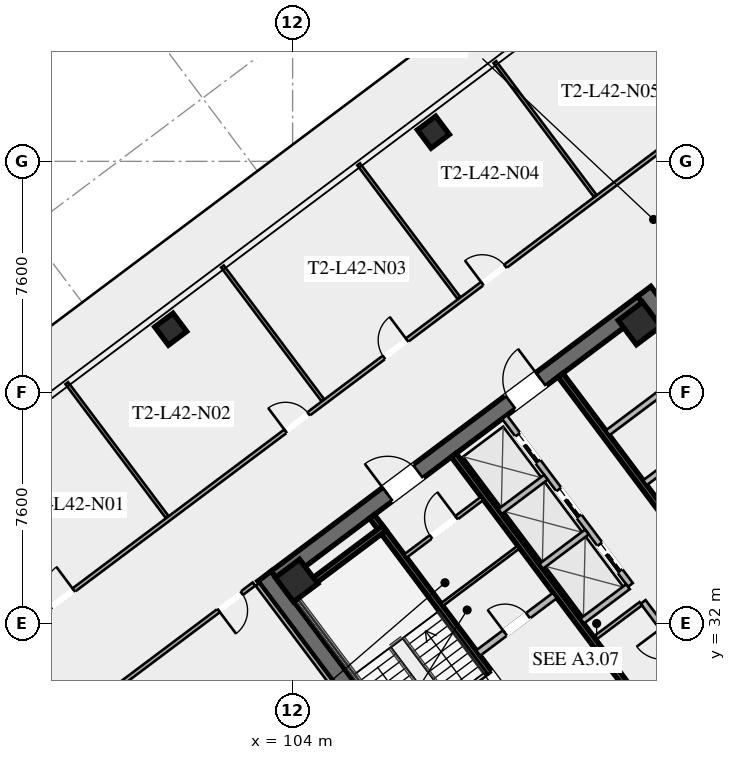
"""IFC4 building model, lengths in metres.
Left out: names, types, materials, properties, quantities, classifications, styles, units other than length and angle.
Written with IfcOpenShell. Run it as: python <this file> out.ifc"""

import sys

from ifc_helpers import new_model, si_unit, direction, frame, frame_2d, origin, origin_2d, place, context, subcontext, project, spatial, rectangle, hollow_rectangle, extrude, element, fill, save


model = new_model("IFC4")
c1 = context("Model", 3, precision=1e-05, world=origin(), true_north=direction((0.0, 1.0)))
c2 = subcontext(c1, "Body", "Model", "MODEL_VIEW")
j1 = project(units=[si_unit("LENGTHUNIT", "METRE"), si_unit("PLANEANGLEUNIT", "RADIAN")], contexts=[c1])
p1 = place(None, origin())
s1 = spatial("IfcSite", under=j1, at=p1, CompositionType="ELEMENT")
p2 = place(p1, origin())
s2 = spatial("IfcBuilding", under=s1, at=p2, CompositionType="ELEMENT")
p3 = place(p2, frame((0.0, 0.0, 157.0)))
s3 = spatial("IfcBuildingStorey", under=s2, at=p3, CompositionType="ELEMENT", Elevation=157.0)
for number, where, z_axis, x_axis in (
    (1, (112.436, 21.077, 0.0), (0.0, 0.0, 1.0), (-0.6, 0.8, 0.0)),
    (2, (115.564, 42.923, 0.0), (0.0, 0.0, 1.0), (0.6, -0.8, 0.0)),
):
    element("IfcWall", number, at=place(p3, frame(where, z_axis=z_axis, x_axis=x_axis)), inside=s3, PredefinedType="SHEAR", context=c2, shape_type="SweptSolid", body=[
        extrude(rectangle(XDim=15.6, YDim=0.55, at=frame_2d((7.8, 0.0))), origin(), (0.0, 0.0, 1.0), 3.55),
    ])
p4 = place(p3, frame((124.539, 30.498, 0.0), z_axis=(0.0, 0.0, 1.0), x_axis=(-0.799998054672, -0.600002593761, 0.0)))
e3 = element("IfcWall", 3, at=p4, inside=s3, PredefinedType="SHEAR", context=c2, shape_type="SweptSolid", body=[
    extrude(rectangle(XDim=15.06, YDim=0.55, at=frame_2d((7.53, 0.0))), origin(), (0.0, 0.0, 1.0), 3.55),
])
p5 = place(p4, frame((9.23, 0.0, 0.0)))
e4 = element("IfcOpeningElement", 4, at=p5, cuts=e3, PredefinedType="OPENING", context=c2, shape_type="SweptSolid", body=[
    extrude(rectangle(XDim=1.25, YDim=2.25, at=frame_2d((0.625, 1.125))), frame((0.0, 0.285, 0.0), z_axis=(0.0, -1.0, 0.0), x_axis=(1.0, 0.0, 0.0)), (0.0, 0.0, 1.0), 0.57),
])
p6 = place(p4, frame((4.18, 0.0, 0.0)))
e5 = element("IfcOpeningElement", 5, at=p6, cuts=e3, PredefinedType="OPENING", context=c2, shape_type="SweptSolid", body=[
    extrude(rectangle(XDim=1.25, YDim=2.25, at=frame_2d((0.625, 1.125))), frame((0.0, 0.285, 0.0), z_axis=(0.0, -1.0, 0.0), x_axis=(1.0, 0.0, 0.0)), (0.0, 0.0, 1.0), 0.57),
])
p7 = place(p3, frame((103.461, 33.502, 0.0), z_axis=(0.0, 0.0, 1.0), x_axis=(0.799998054672, 0.600002593761, 0.0)))
e6 = element("IfcWall", 6, at=p7, inside=s3, PredefinedType="SHEAR", context=c2, shape_type="SweptSolid", body=[
    extrude(rectangle(XDim=15.06, YDim=0.55, at=frame_2d((7.53, 0.0))), origin(), (0.0, 0.0, 1.0), 3.55),
])
p8 = place(p7, frame((4.58, 0.0, 0.0)))
e7 = element("IfcOpeningElement", 7, at=p8, cuts=e6, PredefinedType="OPENING", context=c2, shape_type="SweptSolid", body=[
    extrude(rectangle(XDim=1.25, YDim=2.25, at=frame_2d((0.625, 1.125))), frame((0.0, 0.285, 0.0), z_axis=(0.0, -1.0, 0.0), x_axis=(1.0, 0.0, 0.0)), (0.0, 0.0, 1.0), 0.57),
])
p9 = place(p7, frame((9.63, 0.0, 0.0)))
e8 = element("IfcOpeningElement", 8, at=p9, cuts=e6, PredefinedType="OPENING", context=c2, shape_type="SweptSolid", body=[
    extrude(rectangle(XDim=1.25, YDim=2.25, at=frame_2d((0.625, 1.125))), frame((0.0, 0.285, 0.0), z_axis=(0.0, -1.0, 0.0), x_axis=(1.0, 0.0, 0.0)), (0.0, 0.0, 1.0), 0.57),
])
for number, where, z_axis, x_axis in (
    (9, (115.41, 41.87, 0.0), (0.0, 0.0, 1.0), (0.8, 0.6, 0.0)),
    (10, (104.13, 33.41, 0.0), (0.0, 0.0, 1.0), (0.8, 0.6, 0.0)),
):
    element("IfcColumn", number, at=place(p3, frame(where, z_axis=z_axis, x_axis=x_axis)), inside=s3, PredefinedType="COLUMN", context=c2, shape_type="SweptSolid", body=[
        extrude(hollow_rectangle(XDim=1.0, YDim=1.0, WallThickness=0.04, at=origin_2d()), origin(), (0.0, 0.0, 1.0), 3.37),
    ])
for number, where, z_axis, x_axis in (
    (11, (108.63, 48.16, -0.175), (0.0, 0.0, 1.0), (0.8, 0.6, 0.0)),
    (12, (99.99, 41.68, -0.175), (0.0, 0.0, 1.0), (0.8, 0.6, 0.0)),
):
    element("IfcColumn", number, at=place(p3, frame(where, z_axis=z_axis, x_axis=x_axis)), inside=s3, PredefinedType="COLUMN", context=c2, shape_type="SweptSolid", body=[
        extrude(hollow_rectangle(XDim=0.75, YDim=0.75, WallThickness=0.032, at=origin_2d()), origin(), (0.0, 0.0, 1.0), 3.545),
    ])
p10 = place(p3, frame((111.44, 29.08, 0.0), z_axis=(0.0, 0.0, 1.0), x_axis=(-0.59999029481, 0.8000072788, 0.0)))
e13 = element("IfcWall", 13, at=p10, inside=s3, PredefinedType="SHEAR", context=c2, shape_type="SweptSolid", body=[
    extrude(rectangle(XDim=8.05, YDim=0.2, at=frame_2d((4.025, 0.0))), origin(), (0.0, 0.0, 1.0), 3.37),
])
p11 = place(p10, frame((0.45, 0.0, 0.0)))
e14 = element("IfcOpeningElement", 14, at=p11, cuts=e13, PredefinedType="OPENING", context=c2, shape_type="SweptSolid", body=[
    extrude(rectangle(XDim=1.15, YDim=2.2, at=frame_2d((0.575, 1.1))), frame((0.0, 0.11, 0.0), z_axis=(0.0, -1.0, 0.0), x_axis=(1.0, 0.0, 0.0)), (0.0, 0.0, 1.0), 0.22),
])
p12 = place(p3, frame((103.956, 32.842, 0.0), z_axis=(0.0, 0.0, 1.0), x_axis=(0.800015298837, 0.599979601008, 0.0)))
e15 = element("IfcWall", 15, at=p12, inside=s3, PredefinedType="SHEAR", context=c2, shape_type="SweptSolid", body=[
    extrude(rectangle(XDim=3.83, YDim=0.2, at=frame_2d((1.915, 0.0))), origin(), (0.0, 0.0, 1.0), 3.37),
])
p13 = place(p3, frame((117.998, 25.936, 0.0), z_axis=(0.0, 0.0, 1.0), x_axis=(-0.600002693989, 0.799997979501, 0.0)))
e16 = element("IfcWall", 16, at=p13, inside=s3, PredefinedType="SHEAR", context=c2, shape_type="SweptSolid", body=[
    extrude(rectangle(XDim=14.5, YDim=0.2, at=frame_2d((7.25, 0.0))), origin(), (0.0, 0.0, 1.0), 3.37),
])
p14 = place(p3, frame((110.104, 31.028, 0.0), z_axis=(0.0, 0.0, 1.0), x_axis=(0.800018601094, 0.59997519774, 0.0)))
e17 = element("IfcWall", 17, at=p14, inside=s3, PredefinedType="SOLIDWALL", context=c2, shape_type="SweptSolid", body=[
    extrude(rectangle(XDim=3.15, YDim=0.22, at=frame_2d((1.575, 0.0))), origin(), (0.0, 0.0, 1.0), 2.723),
])
p15 = place(p14, frame((1.1, 0.0, 0.0)))
e18 = element("IfcOpeningElement", 18, at=p15, cuts=e17, PredefinedType="OPENING", context=c2, shape_type="SweptSolid", body=[
    extrude(rectangle(XDim=0.95, YDim=2.05, at=frame_2d((0.475, 1.025))), frame((0.0, 0.12, 0.0), z_axis=(0.0, -1.0, 0.0), x_axis=(1.0, 0.0, 0.0)), (0.0, 0.0, 1.0), 0.24),
])
p16 = place(p3, frame((112.81, 40.17, 0.0), z_axis=(0.0, 0.0, 1.0), x_axis=(0.599993943644, -0.800004542231, 0.0)))
e19 = element("IfcWall", 19, at=p16, inside=s3, PredefinedType="SHEAR", context=c2, shape_type="SweptSolid", body=[
    extrude(rectangle(XDim=6.45, YDim=0.2, at=frame_2d((3.225, 0.0))), origin(), (0.0, 0.0, 1.0), 3.37),
])
for number, where, z_axis, x_axis in (
    (20, (115.59, 36.63, 0.0), (0.0, 0.0, 1.0), (0.8, 0.6, 0.0)),
    (21, (114.36, 38.27, 0.0), (0.0, 0.0, 1.0), (0.8, 0.6, 0.0)),
):
    element("IfcWall", number, at=place(p3, frame(where, z_axis=z_axis, x_axis=x_axis)), inside=s3, PredefinedType="SOLIDWALL", context=c2, shape_type="SweptSolid", body=[
        extrude(rectangle(XDim=3.48, YDim=0.2, at=frame_2d((1.74, 0.0))), origin(), (0.0, 0.0, 1.0), 3.37),
    ])
p17 = place(p3, frame((107.71, 34.22, 0.0), z_axis=(0.0, 0.0, 1.0), x_axis=(0.799981399002, 0.60002480053, 0.0)))
e22 = element("IfcWall", 22, at=p17, inside=s3, PredefinedType="PARTITIONING", context=c2, shape_type="SweptSolid", body=[
    extrude(rectangle(XDim=3.15, YDim=0.135, at=frame_2d((1.575, 0.0))), origin(), (0.0, 0.0, 1.0), 2.723),
])
p18 = place(p17, frame((1.05, 0.0, 0.0)))
e23 = element("IfcOpeningElement", 23, at=p18, cuts=e22, PredefinedType="OPENING", context=c2, shape_type="SweptSolid", body=[
    extrude(rectangle(XDim=1.05, YDim=2.2, at=frame_2d((0.525, 1.1))), frame((0.0, 0.077, 0.0), z_axis=(0.0, -1.0, 0.0), x_axis=(1.0, 0.0, 0.0)), (0.0, 0.0, 1.0), 0.155),
])
p19 = place(p3, frame((108.91, 32.62, 0.0), z_axis=(0.0, 0.0, 1.0), x_axis=(0.800018601094, 0.59997519774, 0.0)))
e24 = element("IfcWall", 24, at=p19, inside=s3, PredefinedType="PARTITIONING", context=c2, shape_type="SweptSolid", body=[
    extrude(rectangle(XDim=3.15, YDim=0.11, at=frame_2d((1.575, 0.0))), origin(), (0.0, 0.0, 1.0), 2.723),
])
p20 = place(p3, frame((119.67, 27.19, 0.0), z_axis=(0.0, 0.0, 1.0), x_axis=(-0.599988677396, 0.800008491828, 0.0)))
e25 = element("IfcWall", 25, at=p20, inside=s3, PredefinedType="SOLIDWALL", context=c2, shape_type="SweptSolid", body=[
    extrude(rectangle(XDim=6.9, YDim=0.2, at=frame_2d((3.45, 0.0))), origin(), (0.0, 0.0, 1.0), 2.723),
])
p21 = place(p20, frame((0.85, 0.0, 0.0)))
e26 = element("IfcOpeningElement", 26, at=p21, cuts=e25, PredefinedType="OPENING", context=c2, shape_type="SweptSolid", body=[
    extrude(rectangle(XDim=0.95, YDim=2.05, at=frame_2d((0.475, 1.025))), frame((0.0, 0.11, 0.0), z_axis=(0.0, -1.0, 0.0), x_axis=(1.0, 0.0, 0.0)), (0.0, 0.0, 1.0), 0.22),
])
p22 = place(p20, frame((4.8, 0.0, 0.0)))
e27 = element("IfcOpeningElement", 27, at=p22, cuts=e25, PredefinedType="OPENING", context=c2, shape_type="SweptSolid", body=[
    extrude(rectangle(XDim=1.05, YDim=2.2, at=frame_2d((0.525, 1.1))), frame((0.0, 0.11, 0.0), z_axis=(0.0, -1.0, 0.0), x_axis=(1.0, 0.0, 0.0)), (0.0, 0.0, 1.0), 0.22),
])
for number, where, z_axis, x_axis in (
    (28, (113.946, 31.522, 0.0), (0.0, 0.0, 1.0), (0.8, 0.6, 0.0)),
    (29, (115.746, 29.122, 0.0), (0.0, 0.0, 1.0), (0.8, 0.6, 0.0)),
):
    element("IfcWall", number, at=place(p3, frame(where, z_axis=z_axis, x_axis=x_axis)), inside=s3, PredefinedType="PARTITIONING", context=c2, shape_type="SweptSolid", body=[
        extrude(rectangle(XDim=1.88, YDim=0.135, at=frame_2d((0.94, 0.0))), origin(), (0.0, 0.0, 1.0), 2.723),
    ])
p23 = place(p3, frame((115.11, 33.27, 0.0), z_axis=(0.0, 0.0, 1.0), x_axis=(-0.600011322243, 0.799991508192, 0.0)))
e30 = element("IfcWall", 30, at=p23, inside=s3, PredefinedType="SOLIDWALL", context=c2, shape_type="SweptSolid", body=[
    extrude(rectangle(XDim=6.9, YDim=0.2, at=frame_2d((3.45, 0.0))), origin(), (0.0, 0.0, 1.0), 3.37),
])
p24 = place(p23, frame((0.575, 0.0, 0.0)))
e31 = element("IfcOpeningElement", 31, at=p24, cuts=e30, PredefinedType="OPENING", context=c2, shape_type="SweptSolid", body=[
    extrude(rectangle(XDim=1.1, YDim=2.2, at=frame_2d((0.55, 1.1))), frame((0.0, 0.11, 0.0), z_axis=(0.0, -1.0, 0.0), x_axis=(1.0, 0.0, 0.0)), (0.0, 0.0, 1.0), 0.22),
])
p25 = place(p23, frame((2.825, 0.0, 0.0)))
e32 = element("IfcOpeningElement", 32, at=p25, cuts=e30, PredefinedType="OPENING", context=c2, shape_type="SweptSolid", body=[
    extrude(rectangle(XDim=1.1, YDim=2.2, at=frame_2d((0.55, 1.1))), frame((0.0, 0.11, 0.0), z_axis=(0.0, -1.0, 0.0), x_axis=(1.0, 0.0, 0.0)), (0.0, 0.0, 1.0), 0.22),
])
p26 = place(p23, frame((5.075, 0.0, 0.0)))
e33 = element("IfcOpeningElement", 33, at=p26, cuts=e30, PredefinedType="OPENING", context=c2, shape_type="SweptSolid", body=[
    extrude(rectangle(XDim=1.1, YDim=2.2, at=frame_2d((0.55, 1.1))), frame((0.0, 0.11, 0.0), z_axis=(0.0, -1.0, 0.0), x_axis=(1.0, 0.0, 0.0)), (0.0, 0.0, 1.0), 0.22),
])
p27 = place(p3, frame((113.526, 32.082, 0.0), z_axis=(0.0, 0.0, 1.0), x_axis=(0.800046745961, 0.599937666993, 0.0)))
e34 = element("IfcWall", 34, at=p27, inside=s3, PredefinedType="SOLIDWALL", context=c2, shape_type="SweptSolid", body=[
    extrude(rectangle(XDim=1.88, YDim=0.2, at=frame_2d((0.94, 0.0))), origin(), (0.0, 0.0, 1.0), 3.37),
])
p28 = place(p3, frame((112.176, 33.882, 0.0), z_axis=(0.0, 0.0, 1.0), x_axis=(0.8, 0.6, 0.0)))
e35 = element("IfcWall", 35, at=p28, inside=s3, PredefinedType="SOLIDWALL", context=c2, shape_type="SweptSolid", body=[
    extrude(rectangle(XDim=1.88, YDim=0.2, at=frame_2d((0.94, 0.0))), origin(), (0.0, 0.0, 1.0), 3.37),
])
p29 = place(p3, frame((110.826, 35.682, 0.0), z_axis=(0.0, 0.0, 1.0), x_axis=(0.799984418148, 0.600020775241, 0.0)))
e36 = element("IfcWall", 36, at=p29, inside=s3, PredefinedType="SOLIDWALL", context=c2, shape_type="SweptSolid", body=[
    extrude(rectangle(XDim=1.88, YDim=0.2, at=frame_2d((0.94, 0.0))), origin(), (0.0, 0.0, 1.0), 3.37),
])
p30 = place(p3, frame((95.8, 32.35, 0.0), z_axis=(0.0, 0.0, 1.0), x_axis=(0.8, 0.6, 0.0)))
e37 = element("IfcWall", 37, at=p30, inside=s3, PredefinedType="PARTITIONING", context=c2, shape_type="SweptSolid", body=[
    extrude(rectangle(XDim=28.7, YDim=0.135, at=frame_2d((14.35, 0.0))), origin(), (0.0, 0.0, 1.0), 2.723),
])
p31 = place(p30, frame((0.3, 0.0, 0.0)))
e38 = element("IfcOpeningElement", 38, at=p31, cuts=e37, PredefinedType="OPENING", context=c2, shape_type="SweptSolid", body=[
    extrude(rectangle(XDim=0.95, YDim=2.05, at=frame_2d((0.475, 1.025))), frame((0.0, 0.077, 0.0), z_axis=(0.0, -1.0, 0.0), x_axis=(1.0, 0.0, 0.0)), (0.0, 0.0, 1.0), 0.155),
])
p32 = place(p30, frame((9.959, 0.0, 0.0)))
e39 = element("IfcOpeningElement", 39, at=p32, cuts=e37, PredefinedType="OPENING", context=c2, shape_type="SweptSolid", body=[
    extrude(rectangle(XDim=0.95, YDim=2.05, at=frame_2d((0.475, 1.025))), frame((0.0, 0.077, 0.0), z_axis=(0.0, -1.0, 0.0), x_axis=(1.0, 0.0, 0.0)), (0.0, 0.0, 1.0), 0.155),
])
p33 = place(p30, frame((14.005, 0.0, 0.0)))
e40 = element("IfcOpeningElement", 40, at=p33, cuts=e37, PredefinedType="OPENING", context=c2, shape_type="SweptSolid", body=[
    extrude(rectangle(XDim=0.95, YDim=2.05, at=frame_2d((0.475, 1.025))), frame((0.0, 0.077, 0.0), z_axis=(0.0, -1.0, 0.0), x_axis=(1.0, 0.0, 0.0)), (0.0, 0.0, 1.0), 0.155),
])
p34 = place(p30, frame((18.049, 0.0, 0.0)))
e41 = element("IfcOpeningElement", 41, at=p34, cuts=e37, PredefinedType="OPENING", context=c2, shape_type="SweptSolid", body=[
    extrude(rectangle(XDim=0.95, YDim=2.05, at=frame_2d((0.475, 1.025))), frame((0.0, 0.077, 0.0), z_axis=(0.0, -1.0, 0.0), x_axis=(1.0, 0.0, 0.0)), (0.0, 0.0, 1.0), 0.155),
])
p35 = place(p30, frame((27.45, 0.0, 0.0)))
e42 = element("IfcOpeningElement", 42, at=p35, cuts=e37, PredefinedType="OPENING", context=c2, shape_type="SweptSolid", body=[
    extrude(rectangle(XDim=0.95, YDim=2.05, at=frame_2d((0.475, 1.025))), frame((0.0, 0.077, 0.0), z_axis=(0.0, -1.0, 0.0), x_axis=(1.0, 0.0, 0.0)), (0.0, 0.0, 1.0), 0.155),
])
p36 = place(p3, frame((99.872, 35.504, 0.0), z_axis=(0.0, 0.0, 1.0), x_axis=(-0.599992897893, 0.800005326531, 0.0)))
e43 = element("IfcWall", 43, at=p36, inside=s3, PredefinedType="PARTITIONING", context=c2, shape_type="SweptSolid", body=[
    extrude(rectangle(XDim=5.5, YDim=0.11, at=frame_2d((2.75, 0.0))), origin(), (0.0, 0.0, 1.0), 2.723),
])
p37 = place(p3, frame((104.992, 39.344, 0.0), z_axis=(0.0, 0.0, 1.0), x_axis=(-0.600014204577, 0.79998934637, 0.0)))
e44 = element("IfcWall", 44, at=p37, inside=s3, PredefinedType="PARTITIONING", context=c2, shape_type="SweptSolid", body=[
    extrude(rectangle(XDim=5.5, YDim=0.11, at=frame_2d((2.75, 0.0))), origin(), (0.0, 0.0, 1.0), 2.723),
])
p38 = place(p3, frame((109.472, 42.704, 0.0), z_axis=(0.0, 0.0, 1.0), x_axis=(-0.599985794856, 0.800010653661, 0.0)))
e45 = element("IfcWall", 45, at=p38, inside=s3, PredefinedType="PARTITIONING", context=c2, shape_type="SweptSolid", body=[
    extrude(rectangle(XDim=5.5, YDim=0.11, at=frame_2d((2.75, 0.0))), origin(), (0.0, 0.0, 1.0), 2.723),
])
p39 = place(p3, frame((113.952, 46.064, 0.0), z_axis=(0.0, 0.0, 1.0), x_axis=(-0.599964488045, 0.800026632735, 0.0)))
e46 = element("IfcWall", 46, at=p39, inside=s3, PredefinedType="PARTITIONING", context=c2, shape_type="SweptSolid", body=[
    extrude(rectangle(XDim=5.5, YDim=0.11, at=frame_2d((2.75, 0.0))), origin(), (0.0, 0.0, 1.0), 2.723),
])
p40 = place(p3, frame((131.282, 32.874, 0.0), z_axis=(0.0, 0.0, 1.0), x_axis=(-0.8, -0.6, 0.0)))
e47 = element("IfcWall", 47, at=p40, inside=s3, PredefinedType="PARTITIONING", context=c2, shape_type="SweptSolid", body=[
    extrude(rectangle(XDim=28.7, YDim=0.135, at=frame_2d((14.35, 0.0))), origin(), (0.0, 0.0, 1.0), 2.723),
])
p41 = place(p40, frame((27.37, 0.0, 0.0)))
e48 = element("IfcOpeningElement", 48, at=p41, cuts=e47, PredefinedType="OPENING", context=c2, shape_type="SweptSolid", body=[
    extrude(rectangle(XDim=0.95, YDim=2.05, at=frame_2d((0.475, 1.025))), frame((0.0, 0.077, 0.0), z_axis=(0.0, -1.0, 0.0), x_axis=(1.0, 0.0, 0.0)), (0.0, 0.0, 1.0), 0.155),
])
p42 = place(p40, frame((13.592, 0.0, 0.0)))
e49 = element("IfcOpeningElement", 49, at=p42, cuts=e47, PredefinedType="OPENING", context=c2, shape_type="SweptSolid", body=[
    extrude(rectangle(XDim=0.95, YDim=2.05, at=frame_2d((0.475, 1.025))), frame((0.0, 0.077, 0.0), z_axis=(0.0, -1.0, 0.0), x_axis=(1.0, 0.0, 0.0)), (0.0, 0.0, 1.0), 0.155),
])
p43 = place(p40, frame((0.38, 0.0, 0.0)))
e50 = element("IfcOpeningElement", 50, at=p43, cuts=e47, PredefinedType="OPENING", context=c2, shape_type="SweptSolid", body=[
    extrude(rectangle(XDim=0.95, YDim=2.05, at=frame_2d((0.475, 1.025))), frame((0.0, 0.077, 0.0), z_axis=(0.0, -1.0, 0.0), x_axis=(1.0, 0.0, 0.0)), (0.0, 0.0, 1.0), 0.155),
])
p44 = place(p3, frame((112.104, 20.928, 0.0), z_axis=(0.0, 0.0, 1.0), x_axis=(-0.599994940075, 0.800003794918, 0.0)))
e51 = element("IfcWall", 51, at=p44, inside=s3, PredefinedType="PARTITIONING", context=c2, shape_type="SweptSolid", body=[
    extrude(rectangle(XDim=15.44, YDim=0.135, at=frame_2d((7.72, 0.0))), origin(), (0.0, 0.0, 1.0), 2.723),
])
p45 = place(p3, frame((102.728, 33.296, 0.0), z_axis=(0.0, 0.0, 1.0), x_axis=(-0.800013722153, -0.59998170336, 0.0)))
e52 = element("IfcWall", 52, at=p45, inside=s3, PredefinedType="PARTITIONING", context=c2, shape_type="SweptSolid", body=[
    extrude(rectangle(XDim=8.54, YDim=0.135, at=frame_2d((4.27, 0.0))), origin(), (0.0, 0.0, 1.0), 2.723),
])
p46 = place(p45, frame((0.5, 0.0, 0.0)))
e53 = element("IfcOpeningElement", 53, at=p46, cuts=e52, PredefinedType="OPENING", context=c2, shape_type="SweptSolid", body=[
    extrude(rectangle(XDim=0.95, YDim=2.05, at=frame_2d((0.475, 1.025))), frame((0.0, 0.077, 0.0), z_axis=(0.0, -1.0, 0.0), x_axis=(1.0, 0.0, 0.0)), (0.0, 0.0, 1.0), 0.155),
])
p47 = place(p8, origin())
e54 = element("IfcDoor", 54, at=p47, inside=s3, OperationType="SINGLE_SWING_LEFT", PredefinedType="DOOR", context=c2, shape_type="SweptSolid", body=[
    extrude(rectangle(XDim=1.25, YDim=2.25, at=frame_2d((0.625, 1.125))), frame((0.0, 0.025, 0.0), z_axis=(0.0, -1.0, 0.0), x_axis=(1.0, 0.0, 0.0)), (0.0, 0.0, 1.0), 0.05),
])
fill(e7, e54)
p48 = place(p9, origin())
e55 = element("IfcDoor", 55, at=p48, inside=s3, OperationType="SINGLE_SWING_RIGHT", PredefinedType="DOOR", context=c2, shape_type="SweptSolid", body=[
    extrude(rectangle(XDim=1.25, YDim=2.25, at=frame_2d((0.625, 1.125))), frame((0.0, 0.025, 0.0), z_axis=(0.0, -1.0, 0.0), x_axis=(1.0, 0.0, 0.0)), (0.0, 0.0, 1.0), 0.05),
])
fill(e8, e55)
p49 = place(p11, origin())
e56 = element("IfcDoor", 56, at=p49, inside=s3, OperationType="SINGLE_SWING_RIGHT", PredefinedType="DOOR", context=c2, shape_type="SweptSolid", body=[
    extrude(rectangle(XDim=1.15, YDim=2.2, at=frame_2d((0.575, 1.1))), frame((0.0, 0.025, 0.0), z_axis=(0.0, -1.0, 0.0), x_axis=(1.0, 0.0, 0.0)), (0.0, 0.0, 1.0), 0.05),
])
fill(e14, e56)
p50 = place(p18, origin())
e57 = element("IfcDoor", 57, at=p50, inside=s3, OperationType="SINGLE_SWING_RIGHT", PredefinedType="DOOR", context=c2, shape_type="SweptSolid", body=[
    extrude(rectangle(XDim=1.05, YDim=2.2, at=frame_2d((0.525, 1.1))), frame((0.0, 0.025, 0.0), z_axis=(0.0, -1.0, 0.0), x_axis=(1.0, 0.0, 0.0)), (0.0, 0.0, 1.0), 0.05),
])
fill(e23, e57)
p51 = place(p15, origin())
e58 = element("IfcDoor", 58, at=p51, inside=s3, OperationType="SINGLE_SWING_LEFT", PredefinedType="DOOR", context=c2, shape_type="SweptSolid", body=[
    extrude(rectangle(XDim=0.95, YDim=2.05, at=frame_2d((0.475, 1.025))), frame((0.0, 0.025, 0.0), z_axis=(0.0, -1.0, 0.0), x_axis=(1.0, 0.0, 0.0)), (0.0, 0.0, 1.0), 0.05),
])
fill(e18, e58)
p52 = place(p31, origin())
e59 = element("IfcDoor", 59, at=p52, inside=s3, OperationType="SINGLE_SWING_RIGHT", PredefinedType="DOOR", context=c2, shape_type="SweptSolid", body=[
    extrude(rectangle(XDim=0.95, YDim=2.05, at=frame_2d((0.475, 1.025))), frame((0.0, 0.025, 0.0), z_axis=(0.0, -1.0, 0.0), x_axis=(1.0, 0.0, 0.0)), (0.0, 0.0, 1.0), 0.05),
])
fill(e38, e59)
p53 = place(p32, origin())
e60 = element("IfcDoor", 60, at=p53, inside=s3, OperationType="SINGLE_SWING_LEFT", PredefinedType="DOOR", context=c2, shape_type="SweptSolid", body=[
    extrude(rectangle(XDim=0.95, YDim=2.05, at=frame_2d((0.475, 1.025))), frame((0.0, 0.025, 0.0), z_axis=(0.0, -1.0, 0.0), x_axis=(1.0, 0.0, 0.0)), (0.0, 0.0, 1.0), 0.05),
])
fill(e39, e60)
p54 = place(p33, origin())
e61 = element("IfcDoor", 61, at=p54, inside=s3, OperationType="SINGLE_SWING_RIGHT", PredefinedType="DOOR", context=c2, shape_type="SweptSolid", body=[
    extrude(rectangle(XDim=0.95, YDim=2.05, at=frame_2d((0.475, 1.025))), frame((0.0, 0.025, 0.0), z_axis=(0.0, -1.0, 0.0), x_axis=(1.0, 0.0, 0.0)), (0.0, 0.0, 1.0), 0.05),
])
fill(e40, e61)
p55 = place(p34, origin())
e62 = element("IfcDoor", 62, at=p55, inside=s3, OperationType="SINGLE_SWING_LEFT", PredefinedType="DOOR", context=c2, shape_type="SweptSolid", body=[
    extrude(rectangle(XDim=0.95, YDim=2.05, at=frame_2d((0.475, 1.025))), frame((0.0, 0.025, 0.0), z_axis=(0.0, -1.0, 0.0), x_axis=(1.0, 0.0, 0.0)), (0.0, 0.0, 1.0), 0.05),
])
fill(e41, e62)
p56 = place(p46, origin())
e63 = element("IfcDoor", 63, at=p56, inside=s3, OperationType="SINGLE_SWING_RIGHT", PredefinedType="DOOR", context=c2, shape_type="SweptSolid", body=[
    extrude(rectangle(XDim=0.95, YDim=2.05, at=frame_2d((0.475, 1.025))), frame((0.0, 0.025, 0.0), z_axis=(0.0, -1.0, 0.0), x_axis=(1.0, 0.0, 0.0)), (0.0, 0.0, 1.0), 0.05),
])
fill(e53, e63)
p57 = place(p24, origin())
e64 = element("IfcDoor", 64, at=p57, inside=s3, OperationType="SLIDING_TO_LEFT", PredefinedType="DOOR", context=c2, shape_type="SweptSolid", body=[
    extrude(rectangle(XDim=1.1, YDim=2.2, at=frame_2d((0.55, 1.1))), frame((0.0, 0.025, 0.0), z_axis=(0.0, -1.0, 0.0), x_axis=(1.0, 0.0, 0.0)), (0.0, 0.0, 1.0), 0.05),
])
fill(e31, e64)
p58 = place(p25, origin())
e65 = element("IfcDoor", 65, at=p58, inside=s3, OperationType="SLIDING_TO_LEFT", PredefinedType="DOOR", context=c2, shape_type="SweptSolid", body=[
    extrude(rectangle(XDim=1.1, YDim=2.2, at=frame_2d((0.55, 1.1))), frame((0.0, 0.025, 0.0), z_axis=(0.0, -1.0, 0.0), x_axis=(1.0, 0.0, 0.0)), (0.0, 0.0, 1.0), 0.05),
])
fill(e32, e65)
p59 = place(p26, origin())
e66 = element("IfcDoor", 66, at=p59, inside=s3, OperationType="SLIDING_TO_LEFT", PredefinedType="DOOR", context=c2, shape_type="SweptSolid", body=[
    extrude(rectangle(XDim=1.1, YDim=2.2, at=frame_2d((0.55, 1.1))), frame((0.0, 0.025, 0.0), z_axis=(0.0, -1.0, 0.0), x_axis=(1.0, 0.0, 0.0)), (0.0, 0.0, 1.0), 0.05),
])
fill(e33, e66)
save(model, sys.argv[1])
